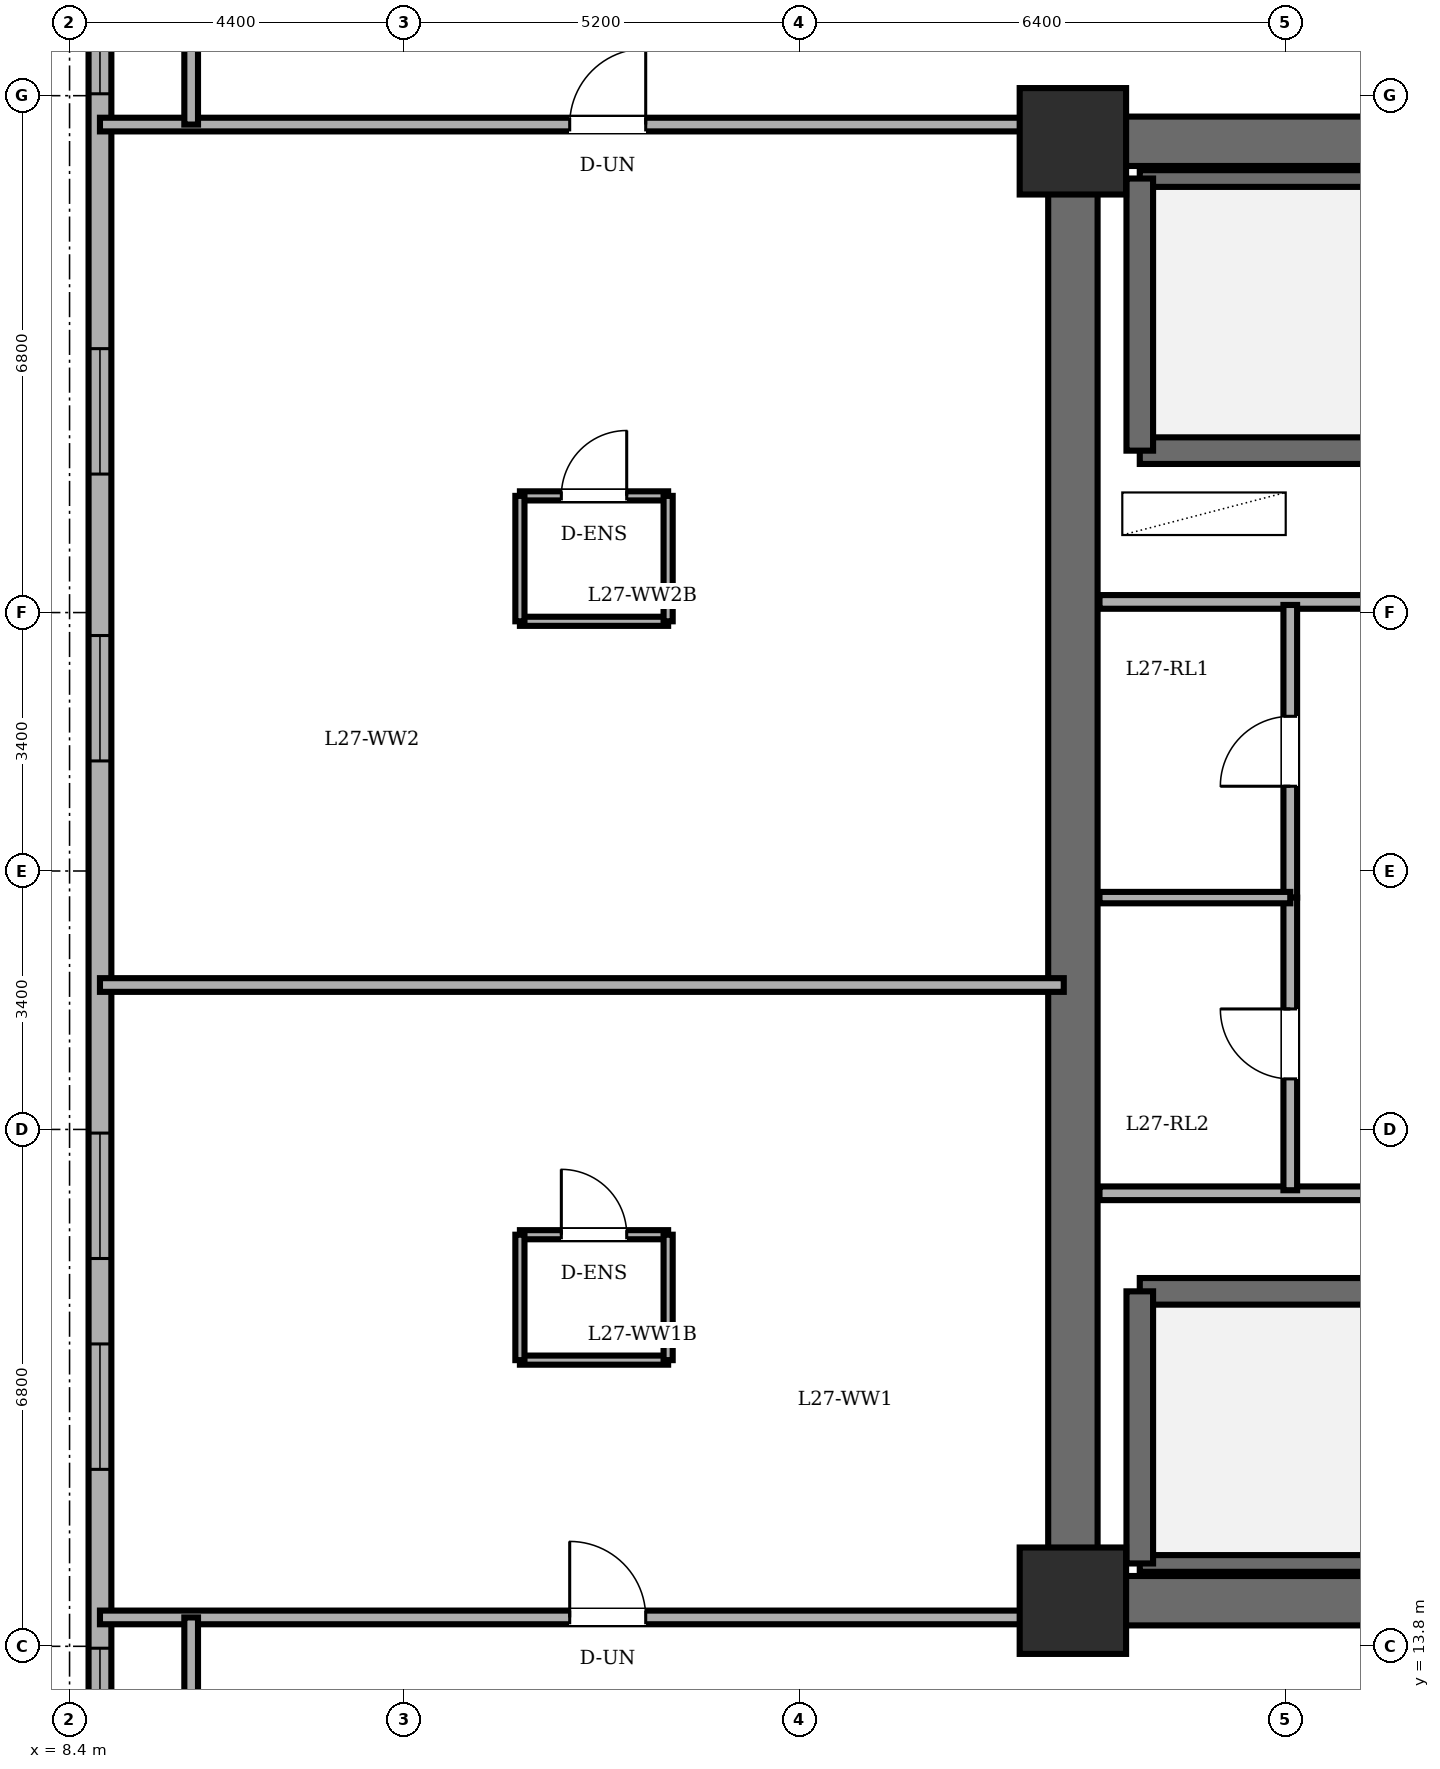
"""IFC4 building model, lengths in metres.
Left out: names, types, materials, properties, quantities, classifications, styles, units other than length and angle.
Written with IfcOpenShell. Run it as: python <this file> out.ifc"""

import sys

from ifc_helpers import new_model, si_unit, direction, frame, frame_2d, origin, origin_2d, place, context, subcontext, project, spatial, rectangle, extrude, element, fill, save


model = new_model("IFC4")
c1 = context("Model", 3, precision=1e-05, world=origin(), true_north=direction((0.0, 1.0)))
c2 = subcontext(c1, "Body", "Model", "MODEL_VIEW")
j1 = project(units=[si_unit("LENGTHUNIT", "METRE"), si_unit("PLANEANGLEUNIT", "RADIAN")], contexts=[c1])
p1 = place(None, origin())
s1 = spatial("IfcSite", under=j1, at=p1, CompositionType="ELEMENT")
p2 = place(p1, origin())
s2 = spatial("IfcBuilding", under=s1, at=p2, CompositionType="ELEMENT")
p3 = place(p2, frame((0.0, 0.0, 104.3)))
s3 = spatial("IfcBuildingStorey", under=s2, at=p3, CompositionType="ELEMENT", Elevation=104.3)
for number, where, z_axis, x_axis in (
    (1, (21.6, 14.4, 0.0), (0.0, 0.0, 1.0), (1.0, 0.0, 0.0)),
    (2, (21.6, 33.6, 0.0), (0.0, 0.0, 1.0), (1.0, 0.0, 0.0)),
):
    element("IfcColumn", number, at=place(p3, frame(where, z_axis=z_axis, x_axis=x_axis)), inside=s3, PredefinedType="COLUMN", context=c2, shape_type="SweptSolid", body=[
        extrude(rectangle(XDim=1.4, YDim=1.4, at=origin_2d()), origin(), (0.0, 0.0, 1.0), 3.6),
    ])
p4 = place(p3, frame((8.8, 38.2, 0.0), z_axis=(0.0, 0.0, 1.0), x_axis=(0.0, -1.0, 0.0)))
e3 = element("IfcWall", 3, at=p4, inside=s3, PredefinedType="SOLIDWALL", context=c2, shape_type="SweptSolid", body=[
    extrude(rectangle(XDim=28.4, YDim=0.3, at=frame_2d((14.2, 0.0))), origin(), (0.0, 0.0, 1.0), 3.4),
])
p5 = place(p4, frame((2.325, 0.0, 0.85)))
e4 = element("IfcOpeningElement", 4, at=p5, cuts=e3, PredefinedType="OPENING", context=c2, shape_type="SweptSolid", body=[
    extrude(rectangle(XDim=1.65, YDim=1.55, at=frame_2d((0.825, 0.775))), frame((0.0, 0.16, 0.0), z_axis=(0.0, -1.0, 0.0), x_axis=(1.0, 0.0, 0.0)), (0.0, 0.0, 1.0), 0.32),
])
p6 = place(p4, frame((7.328, 0.0, 0.85)))
e5 = element("IfcOpeningElement", 5, at=p6, cuts=e3, PredefinedType="OPENING", context=c2, shape_type="SweptSolid", body=[
    extrude(rectangle(XDim=1.65, YDim=1.55, at=frame_2d((0.825, 0.775))), frame((0.0, 0.16, 0.0), z_axis=(0.0, -1.0, 0.0), x_axis=(1.0, 0.0, 0.0)), (0.0, 0.0, 1.0), 0.32),
])
p7 = place(p4, frame((11.102, 0.0, 0.85)))
e6 = element("IfcOpeningElement", 6, at=p7, cuts=e3, PredefinedType="OPENING", context=c2, shape_type="SweptSolid", body=[
    extrude(rectangle(XDim=1.65, YDim=1.55, at=frame_2d((0.825, 0.775))), frame((0.0, 0.16, 0.0), z_axis=(0.0, -1.0, 0.0), x_axis=(1.0, 0.0, 0.0)), (0.0, 0.0, 1.0), 0.32),
])
p8 = place(p4, frame((17.648, 0.0, 0.85)))
e7 = element("IfcOpeningElement", 7, at=p8, cuts=e3, PredefinedType="OPENING", context=c2, shape_type="SweptSolid", body=[
    extrude(rectangle(XDim=1.65, YDim=1.55, at=frame_2d((0.825, 0.775))), frame((0.0, 0.16, 0.0), z_axis=(0.0, -1.0, 0.0), x_axis=(1.0, 0.0, 0.0)), (0.0, 0.0, 1.0), 0.32),
])
p9 = place(p4, frame((20.422, 0.0, 0.85)))
e8 = element("IfcOpeningElement", 8, at=p9, cuts=e3, PredefinedType="OPENING", context=c2, shape_type="SweptSolid", body=[
    extrude(rectangle(XDim=1.65, YDim=1.55, at=frame_2d((0.825, 0.775))), frame((0.0, 0.16, 0.0), z_axis=(0.0, -1.0, 0.0), x_axis=(1.0, 0.0, 0.0)), (0.0, 0.0, 1.0), 0.32),
])
p10 = place(p4, frame((24.425, 0.0, 0.85)))
e9 = element("IfcOpeningElement", 9, at=p10, cuts=e3, PredefinedType="OPENING", context=c2, shape_type="SweptSolid", body=[
    extrude(rectangle(XDim=1.65, YDim=1.55, at=frame_2d((0.825, 0.775))), frame((0.0, 0.16, 0.0), z_axis=(0.0, -1.0, 0.0), x_axis=(1.0, 0.0, 0.0)), (0.0, 0.0, 1.0), 0.32),
])
p11 = place(p3, frame((21.6, 14.4, 0.0), z_axis=(0.0, 0.0, 1.0), x_axis=(0.0, 1.0, 0.0)))
e10 = element("IfcWall", 10, at=p11, inside=s3, PredefinedType="SHEAR", context=c2, shape_type="SweptSolid", body=[
    extrude(rectangle(XDim=19.2, YDim=0.65, at=frame_2d((9.6, 0.0))), origin(), (0.0, 0.0, 1.0), 3.4),
])
for number, where, z_axis, x_axis in (
    (11, (21.6, 33.6, 0.0), (0.0, 0.0, 1.0), (1.0, 0.0, 0.0)),
    (12, (37.2, 14.4, 0.0), (0.0, 0.0, 1.0), (-1.0, 0.0, 0.0)),
):
    element("IfcWall", number, at=place(p3, frame(where, z_axis=z_axis, x_axis=x_axis)), inside=s3, PredefinedType="SHEAR", context=c2, shape_type="SweptSolid", body=[
        extrude(rectangle(XDim=15.6, YDim=0.65, at=frame_2d((7.8, 0.0))), origin(), (0.0, 0.0, 1.0), 3.4),
    ])
p12 = place(p3, frame((22.48, 29.53, 0.0), z_axis=(0.0, 0.0, 1.0), x_axis=(1.0, 0.0, 0.0)))
e13 = element("IfcWall", 13, at=p12, inside=s3, PredefinedType="SOLIDWALL", context=c2, shape_type="SweptSolid", body=[
    extrude(rectangle(XDim=7.79, YDim=0.35, at=frame_2d((3.895, 0.0))), origin(), (0.0, 0.0, 1.0), 3.4),
])
p13 = place(p3, frame((22.48, 33.11, 0.0), z_axis=(0.0, 0.0, 1.0), x_axis=(1.0, 0.0, 0.0)))
e14 = element("IfcWall", 14, at=p13, inside=s3, PredefinedType="PARTITIONING", context=c2, shape_type="SweptSolid", body=[
    extrude(rectangle(XDim=7.79, YDim=0.22, at=frame_2d((3.895, 0.0))), origin(), (0.0, 0.0, 1.0), 3.4),
])
p14 = place(p3, frame((22.48, 29.53, 0.0), z_axis=(0.0, 0.0, 1.0), x_axis=(0.0, 1.0, 0.0)))
e15 = element("IfcWall", 15, at=p14, inside=s3, PredefinedType="SOLIDWALL", context=c2, shape_type="SweptSolid", body=[
    extrude(rectangle(XDim=3.58, YDim=0.35, at=frame_2d((1.79, 0.0))), origin(), (0.0, 0.0, 1.0), 3.4),
])
p15 = place(p3, frame((22.48, 18.47, 0.0), z_axis=(0.0, 0.0, 1.0), x_axis=(1.0, 0.0, 0.0)))
e16 = element("IfcWall", 16, at=p15, inside=s3, PredefinedType="SOLIDWALL", context=c2, shape_type="SweptSolid", body=[
    extrude(rectangle(XDim=7.79, YDim=0.35, at=frame_2d((3.895, 0.0))), origin(), (0.0, 0.0, 1.0), 3.4),
])
p16 = place(p3, frame((22.48, 14.89, 0.0), z_axis=(0.0, 0.0, 1.0), x_axis=(1.0, 0.0, 0.0)))
e17 = element("IfcWall", 17, at=p16, inside=s3, PredefinedType="PARTITIONING", context=c2, shape_type="SweptSolid", body=[
    extrude(rectangle(XDim=7.79, YDim=0.22, at=frame_2d((3.895, 0.0))), origin(), (0.0, 0.0, 1.0), 3.4),
])
p17 = place(p3, frame((22.48, 14.89, 0.0), z_axis=(0.0, 0.0, 1.0), x_axis=(0.0, 1.0, 0.0)))
e18 = element("IfcWall", 18, at=p17, inside=s3, PredefinedType="SOLIDWALL", context=c2, shape_type="SweptSolid", body=[
    extrude(rectangle(XDim=3.58, YDim=0.35, at=frame_2d((1.79, 0.0))), origin(), (0.0, 0.0, 1.0), 3.4),
])
p18 = place(p3, frame((21.95, 27.54, 0.0), z_axis=(0.0, 0.0, 1.0), x_axis=(1.0, 0.0, 0.0)))
e19 = element("IfcWall", 19, at=p18, inside=s3, PredefinedType="PARTITIONING", context=c2, shape_type="SweptSolid", body=[
    extrude(rectangle(XDim=10.56, YDim=0.18, at=frame_2d((5.28, 0.0))), origin(), (0.0, 0.0, 1.0), 3.4),
])
p19 = place(p3, frame((21.95, 19.76, 0.0), z_axis=(0.0, 0.0, 1.0), x_axis=(1.0, 0.0, 0.0)))
e20 = element("IfcWall", 20, at=p19, inside=s3, PredefinedType="PARTITIONING", context=c2, shape_type="SweptSolid", body=[
    extrude(rectangle(XDim=14.87, YDim=0.18, at=frame_2d((7.435, 0.0))), origin(), (0.0, 0.0, 1.0), 3.4),
])
p20 = place(p3, frame((24.46, 23.65, 0.0), z_axis=(0.0, 0.0, 1.0), x_axis=(0.0, 1.0, 0.0)))
e21 = element("IfcWall", 21, at=p20, inside=s3, PredefinedType="PARTITIONING", context=c2, shape_type="SweptSolid", body=[
    extrude(rectangle(XDim=3.85, YDim=0.18, at=frame_2d((1.925, 0.0))), origin(), (0.0, 0.0, 1.0), 3.4),
])
p21 = place(p20, frame((1.465, 0.0, 0.0)))
e22 = element("IfcOpeningElement", 22, at=p21, cuts=e21, PredefinedType="OPENING", context=c2, shape_type="SweptSolid", body=[
    extrude(rectangle(XDim=0.92, YDim=2.1, at=frame_2d((0.46, 1.05))), frame((0.0, 0.1, 0.0), z_axis=(0.0, -1.0, 0.0), x_axis=(1.0, 0.0, 0.0)), (0.0, 0.0, 1.0), 0.2),
])
p22 = place(p3, frame((24.46, 19.8, 0.0), z_axis=(0.0, 0.0, 1.0), x_axis=(0.0, 1.0, 0.0)))
e23 = element("IfcWall", 23, at=p22, inside=s3, PredefinedType="PARTITIONING", context=c2, shape_type="SweptSolid", body=[
    extrude(rectangle(XDim=3.85, YDim=0.18, at=frame_2d((1.925, 0.0))), origin(), (0.0, 0.0, 1.0), 3.4),
])
p23 = place(p22, frame((1.465, 0.0, 0.0)))
e24 = element("IfcOpeningElement", 24, at=p23, cuts=e23, PredefinedType="OPENING", context=c2, shape_type="SweptSolid", body=[
    extrude(rectangle(XDim=0.92, YDim=2.1, at=frame_2d((0.46, 1.05))), frame((0.0, 0.1, 0.0), z_axis=(0.0, -1.0, 0.0), x_axis=(1.0, 0.0, 0.0)), (0.0, 0.0, 1.0), 0.2),
])
p24 = place(p3, frame((21.95, 23.65, 0.0), z_axis=(0.0, 0.0, 1.0), x_axis=(1.0, 0.0, 0.0)))
e25 = element("IfcWall", 25, at=p24, inside=s3, PredefinedType="PARTITIONING", context=c2, shape_type="SweptSolid", body=[
    extrude(rectangle(XDim=2.51, YDim=0.15, at=frame_2d((1.255, 0.0))), origin(), (0.0, 0.0, 1.0), 3.4),
])
p25 = place(p3, frame((14.325, 19.215, 0.0), z_axis=(0.0, 0.0, 1.0), x_axis=(1.0, 0.0, 0.0)))
e26 = element("IfcWall", 26, at=p25, inside=s3, PredefinedType="PARTITIONING", context=c2, shape_type="SweptSolid", body=[
    extrude(rectangle(XDim=1.95, YDim=0.12, at=frame_2d((0.975, 0.0))), origin(), (0.0, 0.0, 1.0), 3.4),
])
p26 = place(p25, frame((0.545, 0.0, 0.0)))
e27 = element("IfcOpeningElement", 27, at=p26, cuts=e26, PredefinedType="OPENING", context=c2, shape_type="SweptSolid", body=[
    extrude(rectangle(XDim=0.86, YDim=2.1, at=frame_2d((0.43, 1.05))), frame((0.0, 0.07, 0.0), z_axis=(0.0, -1.0, 0.0), x_axis=(1.0, 0.0, 0.0)), (0.0, 0.0, 1.0), 0.14),
])
p27 = place(p3, frame((16.275, 17.565, 0.0), z_axis=(0.0, 0.0, 1.0), x_axis=(-1.0, 0.0, 0.0)))
e28 = element("IfcWall", 28, at=p27, inside=s3, PredefinedType="PARTITIONING", context=c2, shape_type="SweptSolid", body=[
    extrude(rectangle(XDim=1.95, YDim=0.12, at=frame_2d((0.975, 0.0))), origin(), (0.0, 0.0, 1.0), 3.4),
])
for number, where, z_axis, x_axis in (
    (29, (14.325, 19.215, 0.0), (0.0, 0.0, 1.0), (0.0, -1.0, 0.0)),
    (30, (16.275, 17.565, 0.0), (0.0, 0.0, 1.0), (0.0, 1.0, 0.0)),
):
    element("IfcWall", number, at=place(p3, frame(where, z_axis=z_axis, x_axis=x_axis)), inside=s3, PredefinedType="PARTITIONING", context=c2, shape_type="SweptSolid", body=[
        extrude(rectangle(XDim=1.65, YDim=0.12, at=frame_2d((0.825, 0.0))), origin(), (0.0, 0.0, 1.0), 3.4),
    ])
p28 = place(p3, frame((14.325, 28.935, 0.0), z_axis=(0.0, 0.0, 1.0), x_axis=(1.0, 0.0, 0.0)))
e31 = element("IfcWall", 31, at=p28, inside=s3, PredefinedType="PARTITIONING", context=c2, shape_type="SweptSolid", body=[
    extrude(rectangle(XDim=1.95, YDim=0.12, at=frame_2d((0.975, 0.0))), origin(), (0.0, 0.0, 1.0), 3.4),
])
p29 = place(p28, frame((0.545, 0.0, 0.0)))
e32 = element("IfcOpeningElement", 32, at=p29, cuts=e31, PredefinedType="OPENING", context=c2, shape_type="SweptSolid", body=[
    extrude(rectangle(XDim=0.86, YDim=2.1, at=frame_2d((0.43, 1.05))), frame((0.0, 0.07, 0.0), z_axis=(0.0, -1.0, 0.0), x_axis=(1.0, 0.0, 0.0)), (0.0, 0.0, 1.0), 0.14),
])
p30 = place(p3, frame((16.275, 27.285, 0.0), z_axis=(0.0, 0.0, 1.0), x_axis=(-1.0, 0.0, 0.0)))
e33 = element("IfcWall", 33, at=p30, inside=s3, PredefinedType="PARTITIONING", context=c2, shape_type="SweptSolid", body=[
    extrude(rectangle(XDim=1.95, YDim=0.12, at=frame_2d((0.975, 0.0))), origin(), (0.0, 0.0, 1.0), 3.4),
])
for number, where, z_axis, x_axis in (
    (34, (14.325, 28.935, 0.0), (0.0, 0.0, 1.0), (0.0, -1.0, 0.0)),
    (35, (16.275, 27.285, 0.0), (0.0, 0.0, 1.0), (0.0, 1.0, 0.0)),
):
    element("IfcWall", number, at=place(p3, frame(where, z_axis=z_axis, x_axis=x_axis)), inside=s3, PredefinedType="PARTITIONING", context=c2, shape_type="SweptSolid", body=[
        extrude(rectangle(XDim=1.65, YDim=0.12, at=frame_2d((0.825, 0.0))), origin(), (0.0, 0.0, 1.0), 3.4),
    ])
p31 = place(p3, frame((8.8, 14.18, 0.0), z_axis=(0.0, 0.0, 1.0), x_axis=(1.0, 0.0, 0.0)))
e36 = element("IfcWall", 36, at=p31, inside=s3, PredefinedType="PARTITIONING", context=c2, shape_type="SweptSolid", body=[
    extrude(rectangle(XDim=12.68, YDim=0.18, at=frame_2d((6.34, 0.0))), origin(), (0.0, 0.0, 1.0), 3.4),
])
p32 = place(p31, frame((6.18, 0.0, 0.0)))
e37 = element("IfcOpeningElement", 37, at=p32, cuts=e36, PredefinedType="OPENING", context=c2, shape_type="SweptSolid", body=[
    extrude(rectangle(XDim=1.0, YDim=2.15, at=frame_2d((0.5, 1.075))), frame((0.0, 0.1, 0.0), z_axis=(0.0, -1.0, 0.0), x_axis=(1.0, 0.0, 0.0)), (0.0, 0.0, 1.0), 0.2),
])
p33 = place(p3, frame((8.8, 22.5, 0.0), z_axis=(0.0, 0.0, 1.0), x_axis=(1.0, 0.0, 0.0)))
e38 = element("IfcWall", 38, at=p33, inside=s3, PredefinedType="PARTITIONING", context=c2, shape_type="SweptSolid", body=[
    extrude(rectangle(XDim=12.68, YDim=0.18, at=frame_2d((6.34, 0.0))), origin(), (0.0, 0.0, 1.0), 3.4),
])
p34 = place(p3, frame((8.8, 33.82, 0.0), z_axis=(0.0, 0.0, 1.0), x_axis=(1.0, 0.0, 0.0)))
e39 = element("IfcWall", 39, at=p34, inside=s3, PredefinedType="PARTITIONING", context=c2, shape_type="SweptSolid", body=[
    extrude(rectangle(XDim=12.68, YDim=0.18, at=frame_2d((6.34, 0.0))), origin(), (0.0, 0.0, 1.0), 3.4),
])
p35 = place(p34, frame((6.18, 0.0, 0.0)))
e40 = element("IfcOpeningElement", 40, at=p35, cuts=e39, PredefinedType="OPENING", context=c2, shape_type="SweptSolid", body=[
    extrude(rectangle(XDim=1.0, YDim=2.15, at=frame_2d((0.5, 1.075))), frame((0.0, 0.1, 0.0), z_axis=(0.0, -1.0, 0.0), x_axis=(1.0, 0.0, 0.0)), (0.0, 0.0, 1.0), 0.2),
])
for number, where, z_axis, x_axis in (
    (41, (10.0, 11.72, 0.0), (0.0, 0.0, 1.0), (0.0, 1.0, 0.0)),
    (42, (10.0, 33.82, 0.0), (0.0, 0.0, 1.0), (0.0, 1.0, 0.0)),
):
    element("IfcWall", number, at=place(p3, frame(where, z_axis=z_axis, x_axis=x_axis)), inside=s3, PredefinedType="PARTITIONING", context=c2, shape_type="SweptSolid", body=[
        extrude(rectangle(XDim=2.46, YDim=0.18, at=frame_2d((1.23, 0.0))), origin(), (0.0, 0.0, 1.0), 3.4),
    ])
p36 = place(p5, origin())
e43 = element("IfcWindow", 43, at=p36, inside=s3, PartitioningType="DOUBLE_PANEL_VERTICAL", PredefinedType="WINDOW", context=c2, shape_type="SweptSolid", body=[
    extrude(rectangle(XDim=1.65, YDim=1.55, at=frame_2d((0.825, 0.775))), frame((0.0, 0.03, 0.0), z_axis=(0.0, -1.0, 0.0), x_axis=(1.0, 0.0, 0.0)), (0.0, 0.0, 1.0), 0.06),
])
fill(e4, e43)
p37 = place(p6, origin())
e44 = element("IfcWindow", 44, at=p37, inside=s3, PartitioningType="DOUBLE_PANEL_VERTICAL", PredefinedType="WINDOW", context=c2, shape_type="SweptSolid", body=[
    extrude(rectangle(XDim=1.65, YDim=1.55, at=frame_2d((0.825, 0.775))), frame((0.0, 0.03, 0.0), z_axis=(0.0, -1.0, 0.0), x_axis=(1.0, 0.0, 0.0)), (0.0, 0.0, 1.0), 0.06),
])
fill(e5, e44)
p38 = place(p7, origin())
e45 = element("IfcWindow", 45, at=p38, inside=s3, PartitioningType="DOUBLE_PANEL_VERTICAL", PredefinedType="WINDOW", context=c2, shape_type="SweptSolid", body=[
    extrude(rectangle(XDim=1.65, YDim=1.55, at=frame_2d((0.825, 0.775))), frame((0.0, 0.03, 0.0), z_axis=(0.0, -1.0, 0.0), x_axis=(1.0, 0.0, 0.0)), (0.0, 0.0, 1.0), 0.06),
])
fill(e6, e45)
p39 = place(p8, origin())
e46 = element("IfcWindow", 46, at=p39, inside=s3, PartitioningType="DOUBLE_PANEL_VERTICAL", PredefinedType="WINDOW", context=c2, shape_type="SweptSolid", body=[
    extrude(rectangle(XDim=1.65, YDim=1.55, at=frame_2d((0.825, 0.775))), frame((0.0, 0.03, 0.0), z_axis=(0.0, -1.0, 0.0), x_axis=(1.0, 0.0, 0.0)), (0.0, 0.0, 1.0), 0.06),
])
fill(e7, e46)
p40 = place(p9, origin())
e47 = element("IfcWindow", 47, at=p40, inside=s3, PartitioningType="DOUBLE_PANEL_VERTICAL", PredefinedType="WINDOW", context=c2, shape_type="SweptSolid", body=[
    extrude(rectangle(XDim=1.65, YDim=1.55, at=frame_2d((0.825, 0.775))), frame((0.0, 0.03, 0.0), z_axis=(0.0, -1.0, 0.0), x_axis=(1.0, 0.0, 0.0)), (0.0, 0.0, 1.0), 0.06),
])
fill(e8, e47)
p41 = place(p10, origin())
e48 = element("IfcWindow", 48, at=p41, inside=s3, PartitioningType="DOUBLE_PANEL_VERTICAL", PredefinedType="WINDOW", context=c2, shape_type="SweptSolid", body=[
    extrude(rectangle(XDim=1.65, YDim=1.55, at=frame_2d((0.825, 0.775))), frame((0.0, 0.03, 0.0), z_axis=(0.0, -1.0, 0.0), x_axis=(1.0, 0.0, 0.0)), (0.0, 0.0, 1.0), 0.06),
])
fill(e9, e48)
p42 = place(p21, origin())
e49 = element("IfcDoor", 49, at=p42, inside=s3, OperationType="SINGLE_SWING_LEFT", PredefinedType="DOOR", context=c2, shape_type="SweptSolid", body=[
    extrude(rectangle(XDim=0.92, YDim=2.1, at=frame_2d((0.46, 1.05))), frame((0.0, 0.025, 0.0), z_axis=(0.0, -1.0, 0.0), x_axis=(1.0, 0.0, 0.0)), (0.0, 0.0, 1.0), 0.05),
])
fill(e22, e49)
p43 = place(p23, origin())
e50 = element("IfcDoor", 50, at=p43, inside=s3, OperationType="SINGLE_SWING_RIGHT", PredefinedType="DOOR", context=c2, shape_type="SweptSolid", body=[
    extrude(rectangle(XDim=0.92, YDim=2.1, at=frame_2d((0.46, 1.05))), frame((0.0, 0.025, 0.0), z_axis=(0.0, -1.0, 0.0), x_axis=(1.0, 0.0, 0.0)), (0.0, 0.0, 1.0), 0.05),
])
fill(e24, e50)
p44 = place(p26, origin())
e51 = element("IfcDoor", 51, at=p44, inside=s3, OperationType="SINGLE_SWING_LEFT", PredefinedType="DOOR", context=c2, shape_type="SweptSolid", body=[
    extrude(rectangle(XDim=0.86, YDim=2.1, at=frame_2d((0.43, 1.05))), frame((0.0, 0.025, 0.0), z_axis=(0.0, -1.0, 0.0), x_axis=(1.0, 0.0, 0.0)), (0.0, 0.0, 1.0), 0.05),
])
fill(e27, e51)
p45 = place(p29, origin())
e52 = element("IfcDoor", 52, at=p45, inside=s3, OperationType="SINGLE_SWING_RIGHT", PredefinedType="DOOR", context=c2, shape_type="SweptSolid", body=[
    extrude(rectangle(XDim=0.86, YDim=2.1, at=frame_2d((0.43, 1.05))), frame((0.0, 0.025, 0.0), z_axis=(0.0, -1.0, 0.0), x_axis=(1.0, 0.0, 0.0)), (0.0, 0.0, 1.0), 0.05),
])
fill(e32, e52)
p46 = place(p32, origin())
e53 = element("IfcDoor", 53, at=p46, inside=s3, OperationType="SINGLE_SWING_LEFT", PredefinedType="DOOR", context=c2, shape_type="SweptSolid", body=[
    extrude(rectangle(XDim=1.0, YDim=2.15, at=frame_2d((0.5, 1.075))), frame((0.0, 0.025, 0.0), z_axis=(0.0, -1.0, 0.0), x_axis=(1.0, 0.0, 0.0)), (0.0, 0.0, 1.0), 0.05),
])
fill(e37, e53)
p47 = place(p35, origin())
e54 = element("IfcDoor", 54, at=p47, inside=s3, OperationType="SINGLE_SWING_RIGHT", PredefinedType="DOOR", context=c2, shape_type="SweptSolid", body=[
    extrude(rectangle(XDim=1.0, YDim=2.15, at=frame_2d((0.5, 1.075))), frame((0.0, 0.025, 0.0), z_axis=(0.0, -1.0, 0.0), x_axis=(1.0, 0.0, 0.0)), (0.0, 0.0, 1.0), 0.05),
])
fill(e40, e54)
save(model, sys.argv[1])
